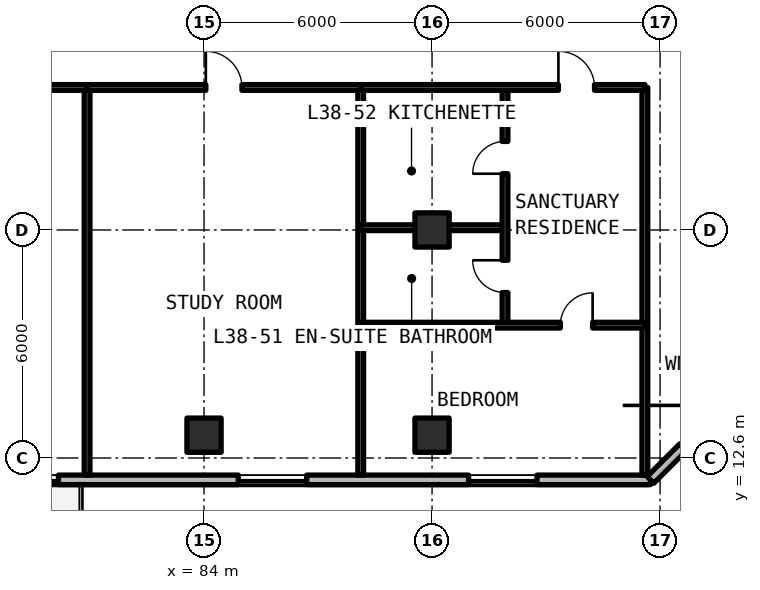
"""IFC4 building model, lengths in metres.
Left out: names, types, materials, properties, quantities, classifications, styles, units other than length and angle.
Written with IfcOpenShell. Run it as: python <this file> out.ifc"""

import sys

from ifc_helpers import new_model, si_unit, direction, frame, frame_2d, origin, origin_2d, place, context, subcontext, project, spatial, rectangle, extrude, element, fill, save


model = new_model("IFC4")
c1 = context("Model", 3, precision=1e-05, world=origin(), true_north=direction((0.0, 1.0)))
c2 = subcontext(c1, "Body", "Model", "MODEL_VIEW")
j1 = project(units=[si_unit("LENGTHUNIT", "METRE"), si_unit("PLANEANGLEUNIT", "RADIAN")], contexts=[c1])
p1 = place(None, origin())
s1 = spatial("IfcSite", under=j1, at=p1, CompositionType="ELEMENT")
p2 = place(p1, origin())
s2 = spatial("IfcBuilding", under=s1, at=p2, CompositionType="ELEMENT")
p3 = place(p2, frame((0.0, 0.0, 138.6)))
s3 = spatial("IfcBuildingStorey", under=s2, at=p3, CompositionType="ELEMENT", Elevation=138.6)
for number, where, z_axis, x_axis in (
    (1, (90.0, 18.6, 0.0), (0.0, 0.0, 1.0), (1.0, 0.0, 0.0)),
    (2, (84.0, 13.2, 0.0), (0.0, 0.0, 1.0), (1.0, 0.0, 0.0)),
    (3, (90.0, 13.2, 0.0), (0.0, 0.0, 1.0), (1.0, 0.0, 0.0)),
):
    element("IfcColumn", number, at=place(p3, frame(where, z_axis=z_axis, x_axis=x_axis)), inside=s3, PredefinedType="COLUMN", context=c2, shape_type="SweptSolid", body=[
        extrude(rectangle(XDim=0.9, YDim=0.9, at=origin_2d()), origin(), (0.0, 0.0, 1.0), 3.3),
    ])
p4 = place(p3, frame((52.125, 12.025, 0.0), z_axis=(0.0, 0.0, 1.0), x_axis=(1.0, 0.0, 0.0)))
e4 = element("IfcWall", 4, at=p4, inside=s3, PredefinedType="SOLIDWALL", context=c2, shape_type="SweptSolid", body=[
    extrude(rectangle(XDim=43.623, YDim=0.25, at=frame_2d((21.812, 0.0))), origin(), (0.0, 0.0, 1.0), 3.08),
])
p5 = place(p4, frame((10.925, 0.0, 0.0)))
e5 = element("IfcOpeningElement", 5, at=p5, cuts=e4, PredefinedType="OPENING", context=c2, shape_type="SweptSolid", body=[
    extrude(rectangle(XDim=1.1, YDim=2.15, at=frame_2d((0.55, 1.075))), frame((0.0, 0.135, 0.0), z_axis=(0.0, -1.0, 0.0), x_axis=(1.0, 0.0, 0.0)), (0.0, 0.0, 1.0), 0.27),
])
p6 = place(p4, frame((22.025, 0.0, 0.0)))
e6 = element("IfcOpeningElement", 6, at=p6, cuts=e4, PredefinedType="OPENING", context=c2, shape_type="SweptSolid", body=[
    extrude(rectangle(XDim=1.1, YDim=2.15, at=frame_2d((0.55, 1.075))), frame((0.0, 0.135, 0.0), z_axis=(0.0, -1.0, 0.0), x_axis=(1.0, 0.0, 0.0)), (0.0, 0.0, 1.0), 0.27),
])
p7 = place(p4, frame((2.738, 0.0, 0.78)))
e7 = element("IfcOpeningElement", 7, at=p7, cuts=e4, PredefinedType="OPENING", context=c2, shape_type="SweptSolid", body=[
    extrude(rectangle(XDim=1.8, YDim=1.66, at=frame_2d((0.9, 0.83))), frame((0.0, 0.135, 0.0), z_axis=(0.0, -1.0, 0.0), x_axis=(1.0, 0.0, 0.0)), (0.0, 0.0, 1.0), 0.27),
])
p8 = place(p4, frame((8.443, 0.0, 0.78)))
e8 = element("IfcOpeningElement", 8, at=p8, cuts=e4, PredefinedType="OPENING", context=c2, shape_type="SweptSolid", body=[
    extrude(rectangle(XDim=0.85, YDim=1.65, at=frame_2d((0.425, 0.825))), frame((0.0, 0.135, 0.0), z_axis=(0.0, -1.0, 0.0), x_axis=(1.0, 0.0, 0.0)), (0.0, 0.0, 1.0), 0.27),
])
p9 = place(p4, frame((14.879, 0.0, 0.78)))
e9 = element("IfcOpeningElement", 9, at=p9, cuts=e4, PredefinedType="OPENING", context=c2, shape_type="SweptSolid", body=[
    extrude(rectangle(XDim=0.85, YDim=1.65, at=frame_2d((0.425, 0.825))), frame((0.0, 0.135, 0.0), z_axis=(0.0, -1.0, 0.0), x_axis=(1.0, 0.0, 0.0)), (0.0, 0.0, 1.0), 0.27),
])
p10 = place(p4, frame((17.184, 0.0, 0.78)))
e10 = element("IfcOpeningElement", 10, at=p10, cuts=e4, PredefinedType="OPENING", context=c2, shape_type="SweptSolid", body=[
    extrude(rectangle(XDim=1.8, YDim=1.66, at=frame_2d((0.9, 0.83))), frame((0.0, 0.135, 0.0), z_axis=(0.0, -1.0, 0.0), x_axis=(1.0, 0.0, 0.0)), (0.0, 0.0, 1.0), 0.27),
])
p11 = place(p4, frame((26.643, 0.0, 0.78)))
e11 = element("IfcOpeningElement", 11, at=p11, cuts=e4, PredefinedType="OPENING", context=c2, shape_type="SweptSolid", body=[
    extrude(rectangle(XDim=1.4, YDim=1.65, at=frame_2d((0.7, 0.825))), frame((0.0, 0.135, 0.0), z_axis=(0.0, -1.0, 0.0), x_axis=(1.0, 0.0, 0.0)), (0.0, 0.0, 1.0), 0.27),
])
p12 = place(p4, frame((32.777, 0.0, 0.78)))
e12 = element("IfcOpeningElement", 12, at=p12, cuts=e4, PredefinedType="OPENING", context=c2, shape_type="SweptSolid", body=[
    extrude(rectangle(XDim=1.8, YDim=1.66, at=frame_2d((0.9, 0.83))), frame((0.0, 0.135, 0.0), z_axis=(0.0, -1.0, 0.0), x_axis=(1.0, 0.0, 0.0)), (0.0, 0.0, 1.0), 0.27),
])
p13 = place(p4, frame((38.836, 0.0, 0.78)))
e13 = element("IfcOpeningElement", 13, at=p13, cuts=e4, PredefinedType="OPENING", context=c2, shape_type="SweptSolid", body=[
    extrude(rectangle(XDim=1.8, YDim=1.66, at=frame_2d((0.9, 0.83))), frame((0.0, 0.135, 0.0), z_axis=(0.0, -1.0, 0.0), x_axis=(1.0, 0.0, 0.0)), (0.0, 0.0, 1.0), 0.27),
])
p14 = place(p3, frame((95.748, 12.025, 0.0), z_axis=(0.0, 0.0, 1.0), x_axis=(0.70708586489, 0.707127696864, 0.0)))
e14 = element("IfcWall", 14, at=p14, inside=s3, PredefinedType="SOLIDWALL", context=c2, shape_type="SweptSolid", body=[
    extrude(rectangle(XDim=5.836, YDim=0.25, at=frame_2d((2.918, 0.0))), origin(), (0.0, 0.0, 1.0), 3.08),
])
p15 = place(p14, frame((1.218, 0.0, 0.78)))
e15 = element("IfcOpeningElement", 15, at=p15, cuts=e14, PredefinedType="OPENING", context=c2, shape_type="SweptSolid", body=[
    extrude(rectangle(XDim=3.4, YDim=1.66, at=frame_2d((1.7, 0.83))), frame((0.0, 0.135, 0.0), z_axis=(0.0, -1.0, 0.0), x_axis=(1.0, 0.0, 0.0)), (0.0, 0.0, 1.0), 0.27),
])
for number, where, z_axis, x_axis in (
    (16, (95.6, 12.15, 0.0), (0.0, 0.0, 1.0), (0.0, 1.0, 0.0)),
    (17, (80.922, 12.15, 0.0), (0.0, 0.0, 1.0), (0.0, 1.0, 0.0)),
):
    element("IfcWall", number, at=place(p3, frame(where, z_axis=z_axis, x_axis=x_axis)), inside=s3, PredefinedType="SOLIDWALL", context=c2, shape_type="SweptSolid", body=[
        extrude(rectangle(XDim=10.2, YDim=0.15, at=frame_2d((5.1, 0.0))), origin(), (0.0, 0.0, 1.0), 2.35),
    ])
p16 = place(p3, frame((73.445, 22.35, 0.0), z_axis=(0.0, 0.0, 1.0), x_axis=(1.0, 0.0, 0.0)))
e18 = element("IfcWall", 18, at=p16, inside=s3, PredefinedType="SOLIDWALL", context=c2, shape_type="SweptSolid", body=[
    extrude(rectangle(XDim=7.478, YDim=0.15, at=frame_2d((3.739, 0.0))), origin(), (0.0, 0.0, 1.0), 2.35),
])
p17 = place(p16, frame((4.479, 0.0, 0.0)))
e19 = element("IfcOpeningElement", 19, at=p17, cuts=e18, PredefinedType="OPENING", context=c2, shape_type="SweptSolid", body=[
    extrude(rectangle(XDim=0.95, YDim=2.15, at=frame_2d((0.475, 1.075))), frame((0.0, 0.085, 0.0), z_axis=(0.0, -1.0, 0.0), x_axis=(1.0, 0.0, 0.0)), (0.0, 0.0, 1.0), 0.17),
])
p18 = place(p3, frame((88.123, 12.15, 0.0), z_axis=(0.0, 0.0, 1.0), x_axis=(0.0, 1.0, 0.0)))
e20 = element("IfcWall", 20, at=p18, inside=s3, PredefinedType="SOLIDWALL", context=c2, shape_type="SweptSolid", body=[
    extrude(rectangle(XDim=10.2, YDim=0.15, at=frame_2d((5.1, 0.0))), origin(), (0.0, 0.0, 1.0), 2.35),
])
p19 = place(p3, frame((80.922, 22.35, 0.0), z_axis=(0.0, 0.0, 1.0), x_axis=(1.0, 0.0, 0.0)))
e21 = element("IfcWall", 21, at=p19, inside=s3, PredefinedType="SOLIDWALL", context=c2, shape_type="SweptSolid", body=[
    extrude(rectangle(XDim=7.2, YDim=0.15, at=frame_2d((3.6, 0.0))), origin(), (0.0, 0.0, 1.0), 2.35),
])
p20 = place(p19, frame((3.125, 0.0, 0.0)))
e22 = element("IfcOpeningElement", 22, at=p20, cuts=e21, PredefinedType="OPENING", context=c2, shape_type="SweptSolid", body=[
    extrude(rectangle(XDim=0.95, YDim=2.15, at=frame_2d((0.475, 1.075))), frame((0.0, 0.085, 0.0), z_axis=(0.0, -1.0, 0.0), x_axis=(1.0, 0.0, 0.0)), (0.0, 0.0, 1.0), 0.17),
])
p21 = place(p3, frame((88.123, 18.66, 0.0), z_axis=(0.0, 0.0, 1.0), x_axis=(1.0, 0.0, 0.0)))
e23 = element("IfcWall", 23, at=p21, inside=s3, PredefinedType="PARTITIONING", context=c2, shape_type="SweptSolid", body=[
    extrude(rectangle(XDim=3.797, YDim=0.15, at=frame_2d((1.899, 0.0))), origin(), (0.0, 0.0, 1.0), 2.35),
])
p22 = place(p3, frame((91.92, 16.095, 0.0), z_axis=(0.0, 0.0, 1.0), x_axis=(0.0, 1.0, 0.0)))
e24 = element("IfcWall", 24, at=p22, inside=s3, PredefinedType="PARTITIONING", context=c2, shape_type="SweptSolid", body=[
    extrude(rectangle(XDim=6.255, YDim=0.15, at=frame_2d((3.127, 0.0))), origin(), (0.0, 0.0, 1.0), 2.35),
])
p23 = place(p22, frame((0.857, 0.0, 0.0)))
e25 = element("IfcOpeningElement", 25, at=p23, cuts=e24, PredefinedType="OPENING", context=c2, shape_type="SweptSolid", body=[
    extrude(rectangle(XDim=0.85, YDim=2.1, at=frame_2d((0.425, 1.05))), frame((0.0, 0.085, 0.0), z_axis=(0.0, -1.0, 0.0), x_axis=(1.0, 0.0, 0.0)), (0.0, 0.0, 1.0), 0.17),
])
p24 = place(p22, frame((3.985, 0.0, 0.0)))
e26 = element("IfcOpeningElement", 26, at=p24, cuts=e24, PredefinedType="OPENING", context=c2, shape_type="SweptSolid", body=[
    extrude(rectangle(XDim=0.85, YDim=2.1, at=frame_2d((0.425, 1.05))), frame((0.0, 0.085, 0.0), z_axis=(0.0, -1.0, 0.0), x_axis=(1.0, 0.0, 0.0)), (0.0, 0.0, 1.0), 0.17),
])
p25 = place(p3, frame((88.123, 16.095, 0.0), z_axis=(0.0, 0.0, 1.0), x_axis=(1.0, 0.0, 0.0)))
e27 = element("IfcWall", 27, at=p25, inside=s3, PredefinedType="PARTITIONING", context=c2, shape_type="SweptSolid", body=[
    extrude(rectangle(XDim=7.478, YDim=0.15, at=frame_2d((3.739, 0.0))), origin(), (0.0, 0.0, 1.0), 2.35),
])
p26 = place(p25, frame((5.252, 0.0, 0.0)))
e28 = element("IfcOpeningElement", 28, at=p26, cuts=e27, PredefinedType="OPENING", context=c2, shape_type="SweptSolid", body=[
    extrude(rectangle(XDim=0.85, YDim=2.1, at=frame_2d((0.425, 1.05))), frame((0.0, 0.085, 0.0), z_axis=(0.0, -1.0, 0.0), x_axis=(1.0, 0.0, 0.0)), (0.0, 0.0, 1.0), 0.17),
])
p27 = place(p3, frame((88.123, 22.35, 0.0), z_axis=(0.0, 0.0, 1.0), x_axis=(1.0, 0.0, 0.0)))
e29 = element("IfcWall", 29, at=p27, inside=s3, PredefinedType="SOLIDWALL", context=c2, shape_type="SweptSolid", body=[
    extrude(rectangle(XDim=7.478, YDim=0.15, at=frame_2d((3.739, 0.0))), origin(), (0.0, 0.0, 1.0), 2.35),
])
p28 = place(p27, frame((5.202, 0.0, 0.0)))
e30 = element("IfcOpeningElement", 30, at=p28, cuts=e29, PredefinedType="OPENING", context=c2, shape_type="SweptSolid", body=[
    extrude(rectangle(XDim=0.95, YDim=2.15, at=frame_2d((0.475, 1.075))), frame((0.0, 0.085, 0.0), z_axis=(0.0, -1.0, 0.0), x_axis=(1.0, 0.0, 0.0)), (0.0, 0.0, 1.0), 0.17),
])
p29 = place(p11, origin())
e31 = element("IfcWindow", 31, at=p29, inside=s3, PartitioningType="SINGLE_PANEL", PredefinedType="WINDOW", context=c2, shape_type="SweptSolid", body=[
    extrude(rectangle(XDim=1.4, YDim=1.65, at=frame_2d((0.7, 0.825))), frame((0.0, 0.03, 0.0), z_axis=(0.0, -1.0, 0.0), x_axis=(1.0, 0.0, 0.0)), (0.0, 0.0, 1.0), 0.06),
])
fill(e11, e31)
p30 = place(p12, origin())
e32 = element("IfcWindow", 32, at=p30, inside=s3, PartitioningType="SINGLE_PANEL", PredefinedType="WINDOW", context=c2, shape_type="SweptSolid", body=[
    extrude(rectangle(XDim=1.8, YDim=1.66, at=frame_2d((0.9, 0.83))), frame((0.0, 0.03, 0.0), z_axis=(0.0, -1.0, 0.0), x_axis=(1.0, 0.0, 0.0)), (0.0, 0.0, 1.0), 0.06),
])
fill(e12, e32)
p31 = place(p13, origin())
e33 = element("IfcWindow", 33, at=p31, inside=s3, PartitioningType="SINGLE_PANEL", PredefinedType="WINDOW", context=c2, shape_type="SweptSolid", body=[
    extrude(rectangle(XDim=1.8, YDim=1.66, at=frame_2d((0.9, 0.83))), frame((0.0, 0.03, 0.0), z_axis=(0.0, -1.0, 0.0), x_axis=(1.0, 0.0, 0.0)), (0.0, 0.0, 1.0), 0.06),
])
fill(e13, e33)
p32 = place(p20, origin())
e34 = element("IfcDoor", 34, at=p32, inside=s3, OperationType="SINGLE_SWING_LEFT", PredefinedType="DOOR", context=c2, shape_type="SweptSolid", body=[
    extrude(rectangle(XDim=0.95, YDim=2.15, at=frame_2d((0.475, 1.075))), frame((0.0, 0.025, 0.0), z_axis=(0.0, -1.0, 0.0), x_axis=(1.0, 0.0, 0.0)), (0.0, 0.0, 1.0), 0.05),
])
fill(e22, e34)
p33 = place(p23, origin())
e35 = element("IfcDoor", 35, at=p33, inside=s3, OperationType="SINGLE_SWING_RIGHT", PredefinedType="DOOR", context=c2, shape_type="SweptSolid", body=[
    extrude(rectangle(XDim=0.85, YDim=2.1, at=frame_2d((0.425, 1.05))), frame((0.0, 0.025, 0.0), z_axis=(0.0, -1.0, 0.0), x_axis=(1.0, 0.0, 0.0)), (0.0, 0.0, 1.0), 0.05),
])
fill(e25, e35)
p34 = place(p24, origin())
e36 = element("IfcDoor", 36, at=p34, inside=s3, OperationType="SINGLE_SWING_LEFT", PredefinedType="DOOR", context=c2, shape_type="SweptSolid", body=[
    extrude(rectangle(XDim=0.85, YDim=2.1, at=frame_2d((0.425, 1.05))), frame((0.0, 0.025, 0.0), z_axis=(0.0, -1.0, 0.0), x_axis=(1.0, 0.0, 0.0)), (0.0, 0.0, 1.0), 0.05),
])
fill(e26, e36)
p35 = place(p26, origin())
e37 = element("IfcDoor", 37, at=p35, inside=s3, OperationType="SINGLE_SWING_RIGHT", PredefinedType="DOOR", context=c2, shape_type="SweptSolid", body=[
    extrude(rectangle(XDim=0.85, YDim=2.1, at=frame_2d((0.425, 1.05))), frame((0.0, 0.025, 0.0), z_axis=(0.0, -1.0, 0.0), x_axis=(1.0, 0.0, 0.0)), (0.0, 0.0, 1.0), 0.05),
])
fill(e28, e37)
p36 = place(p28, origin())
e38 = element("IfcDoor", 38, at=p36, inside=s3, OperationType="SINGLE_SWING_LEFT", PredefinedType="DOOR", context=c2, shape_type="SweptSolid", body=[
    extrude(rectangle(XDim=0.95, YDim=2.15, at=frame_2d((0.475, 1.075))), frame((0.0, 0.025, 0.0), z_axis=(0.0, -1.0, 0.0), x_axis=(1.0, 0.0, 0.0)), (0.0, 0.0, 1.0), 0.05),
])
fill(e30, e38)
save(model, sys.argv[1])
